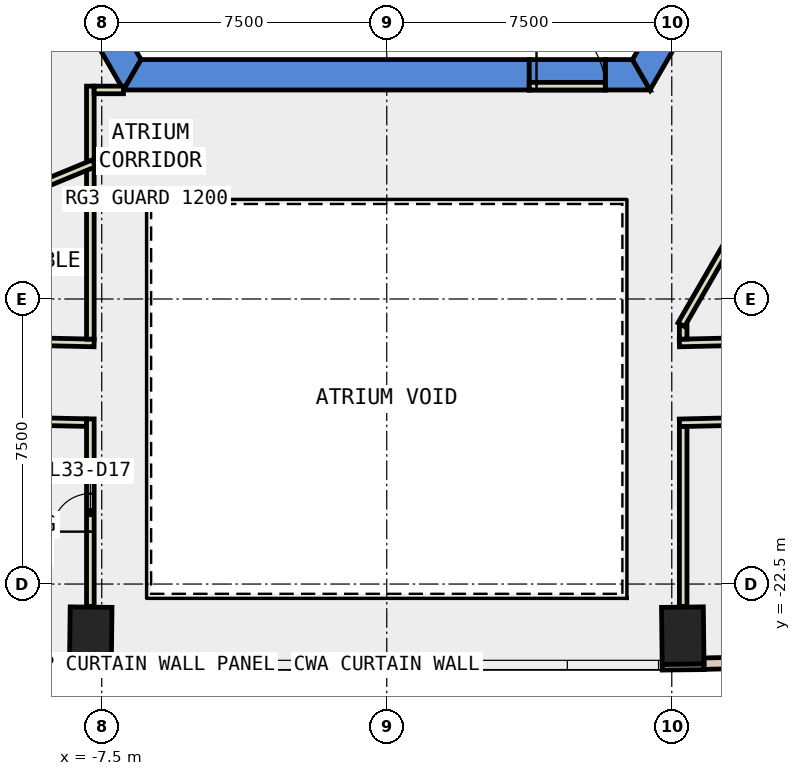
"""IFC4 building model, lengths in metres.
Left out: names, types, materials, properties, quantities, classifications, styles, units other than length and angle.
Written with IfcOpenShell. Run it as: python <this file> out.ifc"""

import sys

from ifc_helpers import new_model, si_unit, direction, frame, frame_2d, origin, origin_2d, place, context, subcontext, project, spatial, polyline, rectangle, outline, extrude, element, fill, save


model = new_model("IFC4")
c1 = context("Model", 3, precision=1e-05, world=origin(), true_north=direction((0.0, 1.0)))
c2 = subcontext(c1, "Body", "Model", "MODEL_VIEW")
j1 = project(units=[si_unit("LENGTHUNIT", "METRE"), si_unit("PLANEANGLEUNIT", "RADIAN")], contexts=[c1])
p1 = place(None, origin())
s1 = spatial("IfcSite", under=j1, at=p1, CompositionType="ELEMENT")
p2 = place(p1, origin())
s2 = spatial("IfcBuilding", under=s1, at=p2, CompositionType="ELEMENT")
p3 = place(p2, frame((0.0, 0.0, 150.8)))
s3 = spatial("IfcBuildingStorey", under=s2, at=p3, CompositionType="ELEMENT", Elevation=150.8)
for number, where, z_axis, x_axis in (
    (1, (-7.789, -23.857, -0.4), (0.0, 0.0, 1.0), (-1.0, 0.012, 0.0)),
    (2, (7.789, -23.857, -0.4), (0.0, 0.0, 1.0), (1.0, 0.012, 0.0)),
):
    element("IfcColumn", number, at=place(p3, frame(where, z_axis=z_axis, x_axis=x_axis)), inside=s3, PredefinedType="COLUMN", context=c2, shape_type="SweptSolid", body=[
        extrude(rectangle(XDim=1.1, YDim=1.5, at=origin_2d()), origin(), (0.0, 0.0, 1.0), 4.2),
    ])
p4 = place(p3, frame((0.0, 0.0, -0.4)))
e3 = element("IfcWall", 3, at=p4, inside=s3, PredefinedType="SHEAR", context=c2, shape_type="SweptSolid", body=[
    extrude(outline(polyline([(-13.856, 2.5), (-6.928, -9.5), (-6.466, -8.7), (-12.933, 2.5), (-13.856, 2.5)])), origin(), (0.0, 0.0, 1.0), 4.2),
])
p5 = place(p3, frame((0.0, 0.0, -0.4)))
e4 = element("IfcWall", 4, at=p5, inside=s3, PredefinedType="SHEAR", context=c2, shape_type="SweptSolid", body=[
    extrude(outline(polyline([(3.75, -9.5), (3.75, -8.7), (-6.466, -8.7), (-6.928, -9.5), (3.75, -9.5)])), origin(), (0.0, 0.0, 1.0), 4.2),
])
p6 = place(p3, frame((0.0, 0.0, -0.4)))
e5 = element("IfcWall", 5, at=p6, inside=s3, PredefinedType="SHEAR", context=c2, shape_type="SweptSolid", body=[
    extrude(outline(polyline([(5.75, -8.7), (5.75, -9.5), (6.928, -9.5), (6.466, -8.7), (5.75, -8.7)])), origin(), (0.0, 0.0, 1.0), 4.2),
])
p7 = place(p3, frame((0.0, 0.0, 3.6)))
e6 = element("IfcWall", 6, at=p7, inside=s3, PredefinedType="SHEAR", context=c2, shape_type="SweptSolid", body=[
    extrude(outline(polyline([(5.75, -9.5), (5.75, -8.7), (3.75, -8.7), (3.75, -9.5), (5.75, -9.5)])), origin(), (0.0, 0.0, 1.0), 0.2),
])
p8 = place(p3, frame((0.0, 0.0, -0.4)))
e7 = element("IfcWall", 7, at=p8, inside=s3, PredefinedType="SHEAR", context=c2, shape_type="SweptSolid", body=[
    extrude(outline(polyline([(8.117, -7.44), (7.424, -7.04), (6.466, -8.7), (6.928, -9.5), (8.117, -7.44)])), origin(), (0.0, 0.0, 1.0), 4.2),
])
for number, where, z_axis, x_axis in (
    (8, (-8.349, -24.676, 0.0), (0.0, 0.0, 1.0), (1.0, -0.011, 0.0)),
    (9, (7.249, -24.688, 0.0), (0.0, 0.0, 1.0), (1.0, 0.011, 0.0)),
):
    element("IfcWall", number, at=place(p3, frame(where, z_axis=z_axis, x_axis=x_axis)), inside=s3, PredefinedType="STANDARD", context=c2, shape_type="SweptSolid", body=[
        extrude(rectangle(XDim=1.1, YDim=0.15, at=frame_2d((0.55, 0.0))), origin(), (0.0, 0.0, 1.0), 3.8),
    ])
p9 = place(p3, frame((-15.68, -24.429, 0.0), z_axis=(0.0, 0.0, 1.0), x_axis=(0.999743825009, -0.022633699594, 0.0)))
e10 = element("IfcWall", 10, at=p9, inside=s3, PredefinedType="STANDARD", context=c2, shape_type="SweptSolid", body=[
    extrude(rectangle(XDim=7.335, YDim=0.3, at=frame_2d((3.667, 0.0))), origin(), (0.0, 0.0, 1.0), 3.8),
])
p10 = place(p9, frame((0.634, 0.0, 0.9)))
e11 = element("IfcOpeningElement", 11, at=p10, cuts=e10, PredefinedType="OPENING", context=c2, shape_type="SweptSolid", body=[
    extrude(rectangle(XDim=2.4, YDim=2.6, at=frame_2d((1.2, 1.3))), frame((0.0, 0.16, 0.0), z_axis=(0.0, -1.0, 0.0), x_axis=(1.0, 0.0, 0.0)), (0.0, 0.0, 1.0), 0.32),
])
p11 = place(p9, frame((4.301, 0.0, 0.9)))
e12 = element("IfcOpeningElement", 12, at=p11, cuts=e10, PredefinedType="OPENING", context=c2, shape_type="SweptSolid", body=[
    extrude(rectangle(XDim=2.4, YDim=2.6, at=frame_2d((1.2, 1.3))), frame((0.0, 0.16, 0.0), z_axis=(0.0, -1.0, 0.0), x_axis=(1.0, 0.0, 0.0)), (0.0, 0.0, 1.0), 0.32),
])
p12 = place(p3, frame((8.347, -24.595, 0.0), z_axis=(0.0, 0.0, 1.0), x_axis=(0.999743825009, 0.022633699594, 0.0)))
e13 = element("IfcWall", 13, at=p12, inside=s3, PredefinedType="STANDARD", context=c2, shape_type="SweptSolid", body=[
    extrude(rectangle(XDim=7.335, YDim=0.3, at=frame_2d((3.667, 0.0))), origin(), (0.0, 0.0, 1.0), 3.8),
])
p13 = place(p12, frame((0.634, 0.0, 0.9)))
e14 = element("IfcOpeningElement", 14, at=p13, cuts=e13, PredefinedType="OPENING", context=c2, shape_type="SweptSolid", body=[
    extrude(rectangle(XDim=2.4, YDim=2.6, at=frame_2d((1.2, 1.3))), frame((0.0, 0.16, 0.0), z_axis=(0.0, -1.0, 0.0), x_axis=(1.0, 0.0, 0.0)), (0.0, 0.0, 1.0), 0.32),
])
p14 = place(p12, frame((4.301, 0.0, 0.9)))
e15 = element("IfcOpeningElement", 15, at=p14, cuts=e13, PredefinedType="OPENING", context=c2, shape_type="SweptSolid", body=[
    extrude(rectangle(XDim=2.4, YDim=2.6, at=frame_2d((1.2, 1.3))), frame((0.0, 0.16, 0.0), z_axis=(0.0, -1.0, 0.0), x_axis=(1.0, 0.0, 0.0)), (0.0, 0.0, 1.0), 0.32),
])
p15 = place(p3, frame((7.7, -16.157, 0.0), z_axis=(0.0, 0.0, 1.0), x_axis=(0.999744539931, 0.022602098978, 0.0)))
e16 = element("IfcWall", 16, at=p15, inside=s3, PredefinedType="PARTITIONING", context=c2, shape_type="SweptSolid", body=[
    extrude(rectangle(XDim=8.274, YDim=0.2, at=frame_2d((4.137, 0.0))), origin(), (0.0, 0.0, 1.0), 3.8),
])
p16 = place(p15, frame((3.237, 0.0, 0.0)))
e17 = element("IfcOpeningElement", 17, at=p16, cuts=e16, PredefinedType="OPENING", context=c2, shape_type="SweptSolid", body=[
    extrude(rectangle(XDim=1.8, YDim=2.1, at=frame_2d((0.9, 1.05))), frame((0.0, 0.11, 0.0), z_axis=(0.0, -1.0, 0.0), x_axis=(1.0, 0.0, 0.0)), (0.0, 0.0, 1.0), 0.22),
])
p17 = place(p3, frame((-14.356, -16.006, 0.0), z_axis=(0.0, 0.0, 1.0), x_axis=(0.999743177933, -0.022662263286, 0.0)))
e18 = element("IfcWall", 18, at=p17, inside=s3, PredefinedType="PARTITIONING", context=c2, shape_type="SweptSolid", body=[
    extrude(rectangle(XDim=6.658, YDim=0.2, at=frame_2d((3.329, 0.0))), origin(), (0.0, 0.0, 1.0), 3.8),
])
p18 = place(p17, frame((2.829, 0.0, 0.0)))
e19 = element("IfcOpeningElement", 19, at=p18, cuts=e18, PredefinedType="OPENING", context=c2, shape_type="SweptSolid", body=[
    extrude(rectangle(XDim=1.0, YDim=2.1, at=frame_2d((0.5, 1.05))), frame((0.0, 0.11, 0.0), z_axis=(0.0, -1.0, 0.0), x_axis=(1.0, 0.0, 0.0)), (0.0, 0.0, 1.0), 0.22),
])
p19 = place(p3, frame((16.111, -18.067, 0.0), z_axis=(0.0, 0.0, 1.0), x_axis=(-0.999741835545, -0.022721405353, 0.0)))
e20 = element("IfcWall", 20, at=p19, inside=s3, PredefinedType="PARTITIONING", context=c2, shape_type="SweptSolid", body=[
    extrude(rectangle(XDim=8.413, YDim=0.2, at=frame_2d((4.207, 0.0))), origin(), (0.0, 0.0, 1.0), 3.8),
])
p20 = place(p19, frame((3.706, 0.0, 0.0)))
e21 = element("IfcOpeningElement", 21, at=p20, cuts=e20, PredefinedType="OPENING", context=c2, shape_type="SweptSolid", body=[
    extrude(rectangle(XDim=1.0, YDim=2.1, at=frame_2d((0.5, 1.05))), frame((0.0, 0.11, 0.0), z_axis=(0.0, -1.0, 0.0), x_axis=(1.0, 0.0, 0.0)), (0.0, 0.0, 1.0), 0.22),
])
p21 = place(p3, frame((-7.9, -18.253, 0.0), z_axis=(0.0, 0.0, 1.0), x_axis=(-0.999745510411, 0.022559131487, 0.0)))
e22 = element("IfcWall", 22, at=p21, inside=s3, PredefinedType="PARTITIONING", context=c2, shape_type="SweptSolid", body=[
    extrude(rectangle(XDim=3.896, YDim=0.2, at=frame_2d((1.948, 0.0))), origin(), (0.0, 0.0, 1.0), 3.8),
])
p22 = place(p3, frame((7.8, -15.69, 0.0), z_axis=(0.0, 0.0, 1.0), x_axis=(0.0, -1.0, 0.0)))
e23 = element("IfcWall", 23, at=p22, inside=s3, PredefinedType="PARTITIONING", context=c2, shape_type="SweptSolid", body=[
    extrude(rectangle(XDim=0.365, YDim=0.2, at=frame_2d((0.183, 0.0))), origin(), (0.0, 0.0, 1.0), 3.8),
])
p23 = place(p3, frame((-7.8, -11.368, 0.0), z_axis=(0.0, 0.0, 1.0), x_axis=(0.0, 1.0, 0.0)))
e24 = element("IfcWall", 24, at=p23, inside=s3, PredefinedType="PARTITIONING", context=c2, shape_type="SweptSolid", body=[
    extrude(rectangle(XDim=1.969, YDim=0.2, at=frame_2d((0.984, 0.0))), origin(), (0.0, 0.0, 1.0), 3.8),
])
p24 = place(p3, frame((-7.7, -9.499, 0.0), z_axis=(0.0, 0.0, 1.0), x_axis=(1.0, 0.0, 0.0)))
e25 = element("IfcWall", 25, at=p24, inside=s3, PredefinedType="PARTITIONING", context=c2, shape_type="SweptSolid", body=[
    extrude(rectangle(XDim=0.771, YDim=0.2, at=frame_2d((0.385, 0.0))), origin(), (0.0, 0.0, 1.0), 3.8),
])
p25 = place(p3, frame((-7.8, -16.055, 0.0), z_axis=(0.0, 0.0, 1.0), x_axis=(0.0, 1.0, 0.0)))
e26 = element("IfcWall", 26, at=p25, inside=s3, PredefinedType="PARTITIONING", context=c2, shape_type="SweptSolid", body=[
    extrude(rectangle(XDim=4.487, YDim=0.2, at=frame_2d((2.243, 0.0))), origin(), (0.0, 0.0, 1.0), 3.8),
])
p26 = place(p3, frame((7.8, -18.355, 0.0), z_axis=(0.0, 0.0, 1.0), x_axis=(0.0, -1.0, 0.0)))
e27 = element("IfcWall", 27, at=p26, inside=s3, PredefinedType="PARTITIONING", context=c2, shape_type="SweptSolid", body=[
    extrude(rectangle(XDim=4.732, YDim=0.2, at=frame_2d((2.366, 0.0))), origin(), (0.0, 0.0, 1.0), 3.8),
])
p27 = place(p3, frame((-7.8, -23.087, 0.0), z_axis=(0.0, 0.0, 1.0), x_axis=(0.0, 1.0, 0.0)))
e28 = element("IfcWall", 28, at=p27, inside=s3, PredefinedType="PARTITIONING", context=c2, shape_type="SweptSolid", body=[
    extrude(rectangle(XDim=4.932, YDim=0.2, at=frame_2d((2.466, 0.0))), origin(), (0.0, 0.0, 1.0), 3.8),
])
p28 = place(p27, frame((1.966, 0.0, 0.0)))
e29 = element("IfcOpeningElement", 29, at=p28, cuts=e28, PredefinedType="OPENING", context=c2, shape_type="SweptSolid", body=[
    extrude(rectangle(XDim=1.0, YDim=2.1, at=frame_2d((0.5, 1.05))), frame((0.0, 0.11, 0.0), z_axis=(0.0, -1.0, 0.0), x_axis=(1.0, 0.0, 0.0)), (0.0, 0.0, 1.0), 0.22),
])
p29 = place(p3, frame((-7.708, -11.43, 0.0), z_axis=(0.0, 0.0, 1.0), x_axis=(-0.924285151797, -0.381702709144, 0.0)))
e30 = element("IfcWall", 30, at=p29, inside=s3, PredefinedType="PARTITIONING", context=c2, shape_type="SweptSolid", body=[
    extrude(rectangle(XDim=8.129, YDim=0.2, at=frame_2d((4.065, 0.0))), origin(), (0.0, 0.0, 1.0), 3.8),
])
p30 = place(p3, frame((3.75, -9.4, 0.0), z_axis=(0.0, 0.0, 1.0), x_axis=(1.0, 0.0, 0.0)))
e31 = element("IfcWall", 31, at=p30, inside=s3, PredefinedType="PARTITIONING", context=c2, shape_type="SweptSolid", body=[
    extrude(rectangle(XDim=2.0, YDim=0.2, at=frame_2d((1.0, 0.0))), origin(), (0.0, 0.0, 1.0), 2.4),
])
p31 = place(p30, frame((0.19, 0.0, 0.0)))
e32 = element("IfcOpeningElement", 32, at=p31, cuts=e31, PredefinedType="OPENING", context=c2, shape_type="SweptSolid", body=[
    extrude(rectangle(XDim=1.8, YDim=2.1, at=frame_2d((0.9, 1.05))), frame((0.0, 0.11, 0.0), z_axis=(0.0, -1.0, 0.0), x_axis=(1.0, 0.0, 0.0)), (0.0, 0.0, 1.0), 0.22),
])
p32 = place(p3, frame((12.401, -7.621, 0.0), z_axis=(0.0, 0.0, 1.0), x_axis=(-0.499983724212, -0.866034800411, 0.0)))
e33 = element("IfcWall", 33, at=p32, inside=s3, PredefinedType="PARTITIONING", context=c2, shape_type="SweptSolid", body=[
    extrude(rectangle(XDim=9.302, YDim=0.2, at=frame_2d((4.651, 0.0))), origin(), (0.0, 0.0, 1.0), 3.8),
])
p33 = place(p28, origin())
e34 = element("IfcDoor", 34, at=p33, inside=s3, OperationType="SINGLE_SWING_LEFT", PredefinedType="DOOR", context=c2, shape_type="SweptSolid", body=[
    extrude(rectangle(XDim=1.0, YDim=2.1, at=frame_2d((0.5, 1.05))), frame((0.0, 0.025, 0.0), z_axis=(0.0, -1.0, 0.0), x_axis=(1.0, 0.0, 0.0)), (0.0, 0.0, 1.0), 0.05),
])
fill(e29, e34)
p34 = place(p31, origin())
e35 = element("IfcDoor", 35, at=p34, inside=s3, OperationType="DOUBLE_DOOR_SINGLE_SWING", PredefinedType="DOOR", context=c2, shape_type="SweptSolid", body=[
    extrude(rectangle(XDim=1.8, YDim=2.1, at=frame_2d((0.9, 1.05))), frame((0.0, 0.025, 0.0), z_axis=(0.0, -1.0, 0.0), x_axis=(1.0, 0.0, 0.0)), (0.0, 0.0, 1.0), 0.05),
])
fill(e32, e35)
save(model, sys.argv[1])
